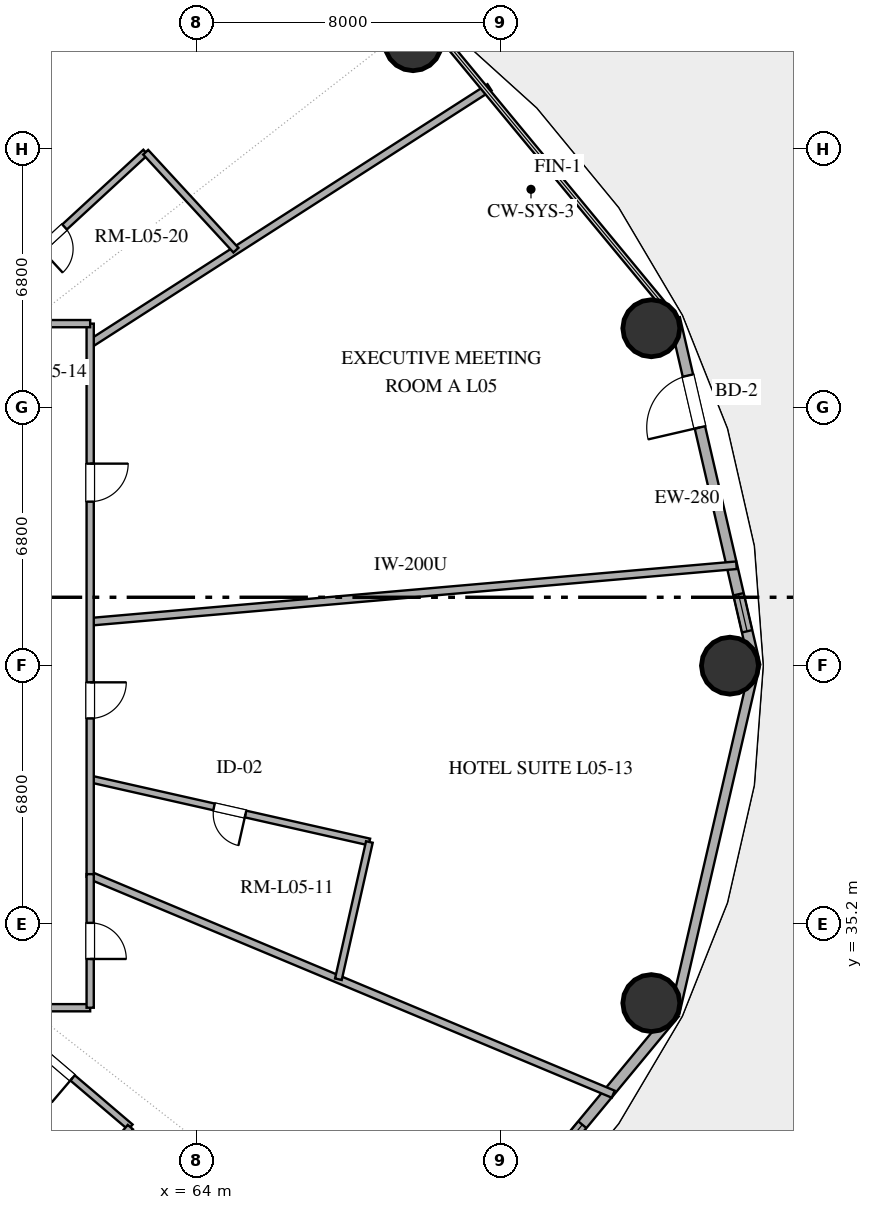
"""IFC4 building model, lengths in metres.
Left out: names, types, materials, properties, quantities, classifications, styles, units other than length and angle.
Written with IfcOpenShell. Run it as: python <this file> out.ifc"""

import sys

from ifc_helpers import new_model, si_unit, direction, frame, frame_2d, origin, origin_2d, place, context, subcontext, project, spatial, rectangle, hollow_circle, extrude, element, fill, save


model = new_model("IFC4")
c1 = context("Model", 3, precision=1e-05, world=origin(), true_north=direction((0.0, 1.0)))
c2 = subcontext(c1, "Body", "Model", "MODEL_VIEW")
j1 = project(units=[si_unit("LENGTHUNIT", "METRE"), si_unit("PLANEANGLEUNIT", "RADIAN")], contexts=[c1])
p1 = place(None, origin())
s1 = spatial("IfcSite", under=j1, at=p1, CompositionType="ELEMENT")
p2 = place(p1, origin())
s2 = spatial("IfcBuilding", under=s1, at=p2, CompositionType="ELEMENT")
p3 = place(p2, frame((0.0, 0.0, 28.2)))
s3 = spatial("IfcBuildingStorey", under=s2, at=p3, CompositionType="ELEMENT", Elevation=28.2)
for number, where, z_axis, x_axis in (
    (1, (78.035, 42.0, 0.0), (0.0, 0.0, 1.0), (1.0, 0.0, 0.0)),
    (2, (75.966, 50.878, 0.0), (0.0, 0.0, 1.0), (1.0, 0.0, 0.0)),
    (3, (69.697, 58.405, 0.0), (0.0, 0.0, 1.0), (1.0, 0.0, 0.0)),
    (4, (75.966, 33.122, 0.0), (0.0, 0.0, 1.0), (1.0, 0.0, 0.0)),
):
    element("IfcColumn", number, at=place(p3, frame(where, z_axis=z_axis, x_axis=x_axis)), inside=s3, PredefinedType="COLUMN", context=c2, shape_type="SweptSolid", body=[
        extrude(hollow_circle(Radius=0.75, WallThickness=0.04, at=origin_2d()), origin(), (0.0, 0.0, 1.0), 3.38),
    ])
p4 = place(p3, frame((78.696, 42.0, 0.0), z_axis=(0.0, 0.0, 1.0), x_axis=(-0.225454452941, 0.974253709076, 0.0)))
e5 = element("IfcWall", 5, at=p4, inside=s3, PredefinedType="SOLIDWALL", context=c2, shape_type="SweptSolid", body=[
    extrude(rectangle(XDim=9.38, YDim=0.28, at=frame_2d((4.69, 0.0))), origin(), (0.0, 0.0, 1.0), 3.38),
])
p5 = place(p4, frame((6.435, 0.0, 0.0)))
e6 = element("IfcOpeningElement", 6, at=p5, cuts=e5, PredefinedType="OPENING", context=c2, shape_type="SweptSolid", body=[
    extrude(rectangle(XDim=1.4, YDim=2.2, at=frame_2d((0.7, 1.1))), frame((0.0, 0.15, 0.0), z_axis=(0.0, -1.0, 0.0), x_axis=(1.0, 0.0, 0.0)), (0.0, 0.0, 1.0), 0.3),
])
p6 = place(p4, frame((0.929, 0.0, 0.85)))
e7 = element("IfcOpeningElement", 7, at=p6, cuts=e5, PredefinedType="OPENING", context=c2, shape_type="SweptSolid", body=[
    extrude(rectangle(XDim=1.0, YDim=1.8, at=frame_2d((0.5, 0.9))), frame((0.0, 0.15, 0.0), z_axis=(0.0, -1.0, 0.0), x_axis=(1.0, 0.0, 0.0)), (0.0, 0.0, 1.0), 0.3),
])
p7 = place(p3, frame((70.174, 25.114, 0.0), z_axis=(0.0, 0.0, 1.0), x_axis=(0.637296809613, 0.770618437657, 0.0)))
e8 = element("IfcWall", 8, at=p7, inside=s3, PredefinedType="SOLIDWALL", context=c2, shape_type="SweptSolid", body=[
    extrude(rectangle(XDim=10.053, YDim=0.28, at=frame_2d((5.027, 0.0))), origin(), (0.0, 0.0, 1.0), 3.38),
])
p8 = place(p7, frame((2.353, 0.0, 0.85)))
e9 = element("IfcOpeningElement", 9, at=p8, cuts=e8, PredefinedType="OPENING", context=c2, shape_type="SweptSolid", body=[
    extrude(rectangle(XDim=1.5, YDim=1.8, at=frame_2d((0.75, 0.9))), frame((0.0, 0.15, 0.0), z_axis=(0.0, -1.0, 0.0), x_axis=(1.0, 0.0, 0.0)), (0.0, 0.0, 1.0), 0.3),
])
p9 = place(p7, frame((4.74, 0.0, 0.85)))
e10 = element("IfcOpeningElement", 10, at=p9, cuts=e8, PredefinedType="OPENING", context=c2, shape_type="SweptSolid", body=[
    extrude(rectangle(XDim=1.5, YDim=1.8, at=frame_2d((0.75, 0.9))), frame((0.0, 0.15, 0.0), z_axis=(0.0, -1.0, 0.0), x_axis=(1.0, 0.0, 0.0)), (0.0, 0.0, 1.0), 0.3),
])
p10 = place(p3, frame((76.581, 32.862, 0.0), z_axis=(0.0, 0.0, 1.0), x_axis=(0.225454452941, 0.974253709076, 0.0)))
e11 = element("IfcWall", 11, at=p10, inside=s3, PredefinedType="SOLIDWALL", context=c2, shape_type="SweptSolid", body=[
    extrude(rectangle(XDim=9.38, YDim=0.25, at=frame_2d((4.69, 0.0))), origin(), (0.0, 0.0, 1.0), 3.38),
])
p11 = place(p3, frame((61.2, 43.155, 0.0), z_axis=(0.0, 0.0, 1.0), x_axis=(0.996194943742, 0.087152934912, 0.0)))
e12 = element("IfcWall", 12, at=p11, inside=s3, PredefinedType="PARTITIONING", context=c2, shape_type="SweptSolid", body=[
    extrude(rectangle(XDim=17.071, YDim=0.2, at=frame_2d((8.536, 0.0))), origin(), (0.0, 0.0, 1.0), 2.74),
])
p12 = place(p3, frame((53.116, 51.0, 0.0), z_axis=(0.0, 0.0, 1.0), x_axis=(0.494167535405, 0.869366693031, 0.0)))
e13 = element("IfcWall", 13, at=p12, inside=s3, PredefinedType="PARTITIONING", context=c2, shape_type="SweptSolid", body=[
    extrude(rectangle(XDim=14.934, YDim=0.2, at=frame_2d((7.467, 0.0))), origin(), (0.0, 0.0, 1.0), 2.74),
])
p13 = place(p3, frame((61.2, 50.472, 0.0), z_axis=(0.0, 0.0, 1.0), x_axis=(0.841576538847, 0.540137879863, 0.0)))
e14 = element("IfcWall", 14, at=p13, inside=s3, PredefinedType="PARTITIONING", context=c2, shape_type="SweptSolid", body=[
    extrude(rectangle(XDim=12.487, YDim=0.2, at=frame_2d((6.244, 0.0))), origin(), (0.0, 0.0, 1.0), 2.74),
])
p14 = place(p3, frame((61.2, 36.48, 0.0), z_axis=(0.0, 0.0, 1.0), x_axis=(0.922585702004, -0.385792201136, 0.0)))
e15 = element("IfcWall", 15, at=p14, inside=s3, PredefinedType="PARTITIONING", context=c2, shape_type="SweptSolid", body=[
    extrude(rectangle(XDim=14.918, YDim=0.2, at=frame_2d((7.459, 0.0))), origin(), (0.0, 0.0, 1.0), 2.74),
])
p15 = place(p3, frame((68.547, 37.361, 0.0), z_axis=(0.0, 0.0, 1.0), x_axis=(-0.975442349969, 0.220254902072, 0.0)))
e16 = element("IfcWall", 16, at=p15, inside=s3, PredefinedType="PLUMBINGWALL", context=c2, shape_type="SweptSolid", body=[
    extrude(rectangle(XDim=7.532, YDim=0.18, at=frame_2d((3.766, 0.0))), origin(), (0.0, 0.0, 1.0), 2.74),
])
p16 = place(p15, frame((3.341, 0.0, 0.0)))
e17 = element("IfcOpeningElement", 17, at=p16, cuts=e16, PredefinedType="OPENING", context=c2, shape_type="SweptSolid", body=[
    extrude(rectangle(XDim=0.85, YDim=2.1, at=frame_2d((0.425, 1.05))), frame((0.0, 0.1, 0.0), z_axis=(0.0, -1.0, 0.0), x_axis=(1.0, 0.0, 0.0)), (0.0, 0.0, 1.0), 0.2),
])
p17 = place(p3, frame((61.2, 51.0, 0.0), z_axis=(0.0, 0.0, 1.0), x_axis=(0.0, -1.0, 0.0)))
e18 = element("IfcWall", 18, at=p17, inside=s3, PredefinedType="PARTITIONING", context=c2, shape_type="SweptSolid", body=[
    extrude(rectangle(XDim=14.554, YDim=0.19, at=frame_2d((7.277, 0.0))), origin(), (0.0, 0.0, 1.0), 2.74),
])
p18 = place(p17, frame((3.684, 0.0, 0.0)))
e19 = element("IfcOpeningElement", 19, at=p18, cuts=e18, PredefinedType="OPENING", context=c2, shape_type="SweptSolid", body=[
    extrude(rectangle(XDim=1.0, YDim=2.2, at=frame_2d((0.5, 1.1))), frame((0.0, 0.105, 0.0), z_axis=(0.0, -1.0, 0.0), x_axis=(1.0, 0.0, 0.0)), (0.0, 0.0, 1.0), 0.21),
])
p19 = place(p17, frame((9.438, 0.0, 0.0)))
e20 = element("IfcOpeningElement", 20, at=p19, cuts=e18, PredefinedType="OPENING", context=c2, shape_type="SweptSolid", body=[
    extrude(rectangle(XDim=0.95, YDim=2.15, at=frame_2d((0.475, 1.075))), frame((0.0, 0.105, 0.0), z_axis=(0.0, -1.0, 0.0), x_axis=(1.0, 0.0, 0.0)), (0.0, 0.0, 1.0), 0.21),
])
p20 = place(p3, frame((55.449, 33.0, 0.0), z_axis=(0.0, 0.0, 1.0), x_axis=(0.637638501905, -0.770335732579, 0.0)))
e21 = element("IfcWall", 21, at=p20, inside=s3, PredefinedType="PARTITIONING", context=c2, shape_type="SweptSolid", body=[
    extrude(rectangle(XDim=14.187, YDim=0.2, at=frame_2d((7.094, 0.0))), origin(), (0.0, 0.0, 1.0), 2.74),
])
p21 = place(p3, frame((62.66, 55.51, 0.0), z_axis=(0.0, 0.0, 1.0), x_axis=(-0.735369975398, -0.67766584633, 0.0)))
e22 = element("IfcWall", 22, at=p21, inside=s3, PredefinedType="PLUMBINGWALL", context=c2, shape_type="SweptSolid", body=[
    extrude(rectangle(XDim=6.655, YDim=0.18, at=frame_2d((3.328, 0.0))), origin(), (0.0, 0.0, 1.0), 2.74),
])
p22 = place(p21, frame((2.903, 0.0, 0.0)))
e23 = element("IfcOpeningElement", 23, at=p22, cuts=e22, PredefinedType="OPENING", context=c2, shape_type="SweptSolid", body=[
    extrude(rectangle(XDim=0.85, YDim=2.1, at=frame_2d((0.425, 1.05))), frame((0.0, 0.1, 0.0), z_axis=(0.0, -1.0, 0.0), x_axis=(1.0, 0.0, 0.0)), (0.0, 0.0, 1.0), 0.2),
])
p23 = place(p3, frame((62.258, 29.859, 0.0), z_axis=(0.0, 0.0, 1.0), x_axis=(-0.761358380859, 0.648331254758, 0.0)))
e24 = element("IfcWall", 24, at=p23, inside=s3, PredefinedType="PLUMBINGWALL", context=c2, shape_type="SweptSolid", body=[
    extrude(rectangle(XDim=4.845, YDim=0.18, at=frame_2d((2.422, 0.0))), origin(), (0.0, 0.0, 1.0), 2.74),
])
p24 = place(p23, frame((1.997, 0.0, 0.0)))
e25 = element("IfcOpeningElement", 25, at=p24, cuts=e24, PredefinedType="OPENING", context=c2, shape_type="SweptSolid", body=[
    extrude(rectangle(XDim=0.85, YDim=2.1, at=frame_2d((0.425, 1.05))), frame((0.0, 0.1, 0.0), z_axis=(0.0, -1.0, 0.0), x_axis=(1.0, 0.0, 0.0)), (0.0, 0.0, 1.0), 0.2),
])
p25 = place(p3, frame((51.179, 51.0, 0.0), z_axis=(0.0, 0.0, 1.0), x_axis=(1.0, 0.0, 0.0)))
e26 = element("IfcWall", 26, at=p25, inside=s3, PredefinedType="PARTITIONING", context=c2, shape_type="SweptSolid", body=[
    extrude(rectangle(XDim=10.021, YDim=0.19, at=frame_2d((5.01, 0.0))), origin(), (0.0, 0.0, 1.0), 2.74),
])
p26 = place(p25, frame((3.792, 0.0, 0.0)))
e27 = element("IfcOpeningElement", 27, at=p26, cuts=e26, PredefinedType="OPENING", context=c2, shape_type="SweptSolid", body=[
    extrude(rectangle(XDim=0.95, YDim=2.15, at=frame_2d((0.475, 1.075))), frame((0.0, 0.105, 0.0), z_axis=(0.0, -1.0, 0.0), x_axis=(1.0, 0.0, 0.0)), (0.0, 0.0, 1.0), 0.21),
])
p27 = place(p3, frame((61.2, 33.0, 0.0), z_axis=(0.0, 0.0, 1.0), x_axis=(-1.0, 0.0, 0.0)))
e28 = element("IfcWall", 28, at=p27, inside=s3, PredefinedType="PARTITIONING", context=c2, shape_type="SweptSolid", body=[
    extrude(rectangle(XDim=11.3, YDim=0.19, at=frame_2d((5.65, 0.0))), origin(), (0.0, 0.0, 1.0), 2.74),
])
p28 = place(p27, frame((7.188, 0.0, 0.0)))
e29 = element("IfcOpeningElement", 29, at=p28, cuts=e28, PredefinedType="OPENING", context=c2, shape_type="SweptSolid", body=[
    extrude(rectangle(XDim=0.95, YDim=2.15, at=frame_2d((0.475, 1.075))), frame((0.0, 0.105, 0.0), z_axis=(0.0, -1.0, 0.0), x_axis=(1.0, 0.0, 0.0)), (0.0, 0.0, 1.0), 0.21),
])
p29 = place(p3, frame((67.731, 33.749, 0.0), z_axis=(0.0, 0.0, 1.0), x_axis=(0.220238608567, 0.9754460289, 0.0)))
e30 = element("IfcWall", 30, at=p29, inside=s3, PredefinedType="PLUMBINGWALL", context=c2, shape_type="SweptSolid", body=[
    extrude(rectangle(XDim=3.702, YDim=0.18, at=frame_2d((1.851, 0.0))), origin(), (0.0, 0.0, 1.0), 2.74),
])
p30 = place(p3, frame((61.2, 36.515, 0.0), z_axis=(0.0, 0.0, 1.0), x_axis=(0.0, -1.0, 0.0)))
e31 = element("IfcWall", 31, at=p30, inside=s3, PredefinedType="PARTITIONING", context=c2, shape_type="SweptSolid", body=[
    extrude(rectangle(XDim=3.515, YDim=0.19, at=frame_2d((1.758, 0.0))), origin(), (0.0, 0.0, 1.0), 2.74),
])
p31 = place(p30, frame((1.282, 0.0, 0.0)))
e32 = element("IfcOpeningElement", 32, at=p31, cuts=e31, PredefinedType="OPENING", context=c2, shape_type="SweptSolid", body=[
    extrude(rectangle(XDim=0.95, YDim=2.15, at=frame_2d((0.475, 1.075))), frame((0.0, 0.105, 0.0), z_axis=(0.0, -1.0, 0.0), x_axis=(1.0, 0.0, 0.0)), (0.0, 0.0, 1.0), 0.21),
])
p32 = place(p3, frame((65.035, 52.933, 0.0), z_axis=(0.0, 0.0, 1.0), x_axis=(-0.677675106239, 0.735361442002, 0.0)))
e33 = element("IfcWall", 33, at=p32, inside=s3, PredefinedType="PLUMBINGWALL", context=c2, shape_type="SweptSolid", body=[
    extrude(rectangle(XDim=3.504, YDim=0.18, at=frame_2d((1.752, 0.0))), origin(), (0.0, 0.0, 1.0), 2.74),
])
p33 = place(p3, frame((60.124, 27.353, 0.0), z_axis=(0.0, 0.0, 1.0), x_axis=(0.648326357453, 0.76136255111, 0.0)))
e34 = element("IfcWall", 34, at=p33, inside=s3, PredefinedType="PLUMBINGWALL", context=c2, shape_type="SweptSolid", body=[
    extrude(rectangle(XDim=3.292, YDim=0.18, at=frame_2d((1.646, 0.0))), origin(), (0.0, 0.0, 1.0), 2.74),
])
p34 = place(p5, origin())
e35 = element("IfcDoor", 35, at=p34, inside=s3, OperationType="SINGLE_SWING_LEFT", PredefinedType="DOOR", context=c2, shape_type="SweptSolid", body=[
    extrude(rectangle(XDim=1.4, YDim=2.2, at=frame_2d((0.7, 1.1))), frame((0.0, 0.025, 0.0), z_axis=(0.0, -1.0, 0.0), x_axis=(1.0, 0.0, 0.0)), (0.0, 0.0, 1.0), 0.05),
])
fill(e6, e35)
p35 = place(p9, origin())
e36 = element("IfcWindow", 36, at=p35, inside=s3, PartitioningType="SINGLE_PANEL", PredefinedType="WINDOW", context=c2, shape_type="SweptSolid", body=[
    extrude(rectangle(XDim=1.5, YDim=1.8, at=frame_2d((0.75, 0.9))), frame((0.0, 0.03, 0.0), z_axis=(0.0, -1.0, 0.0), x_axis=(1.0, 0.0, 0.0)), (0.0, 0.0, 1.0), 0.06),
])
fill(e10, e36)
p36 = place(p6, origin())
e37 = element("IfcWindow", 37, at=p36, inside=s3, PartitioningType="SINGLE_PANEL", PredefinedType="WINDOW", context=c2, shape_type="SweptSolid", body=[
    extrude(rectangle(XDim=1.0, YDim=1.8, at=frame_2d((0.5, 0.9))), frame((0.0, 0.03, 0.0), z_axis=(0.0, -1.0, 0.0), x_axis=(1.0, 0.0, 0.0)), (0.0, 0.0, 1.0), 0.06),
])
fill(e7, e37)
p37 = place(p16, origin())
e38 = element("IfcDoor", 38, at=p37, inside=s3, OperationType="SINGLE_SWING_LEFT", PredefinedType="DOOR", context=c2, shape_type="SweptSolid", body=[
    extrude(rectangle(XDim=0.85, YDim=2.1, at=frame_2d((0.425, 1.05))), frame((0.0, 0.025, 0.0), z_axis=(0.0, -1.0, 0.0), x_axis=(1.0, 0.0, 0.0)), (0.0, 0.0, 1.0), 0.05),
])
fill(e17, e38)
p38 = place(p18, origin())
e39 = element("IfcDoor", 39, at=p38, inside=s3, OperationType="SINGLE_SWING_LEFT", PredefinedType="DOOR", context=c2, shape_type="SweptSolid", body=[
    extrude(rectangle(XDim=1.0, YDim=2.2, at=frame_2d((0.5, 1.1))), frame((0.0, 0.025, 0.0), z_axis=(0.0, -1.0, 0.0), x_axis=(1.0, 0.0, 0.0)), (0.0, 0.0, 1.0), 0.05),
])
fill(e19, e39)
p39 = place(p19, origin())
e40 = element("IfcDoor", 40, at=p39, inside=s3, OperationType="SINGLE_SWING_LEFT", PredefinedType="DOOR", context=c2, shape_type="SweptSolid", body=[
    extrude(rectangle(XDim=0.95, YDim=2.15, at=frame_2d((0.475, 1.075))), frame((0.0, 0.025, 0.0), z_axis=(0.0, -1.0, 0.0), x_axis=(1.0, 0.0, 0.0)), (0.0, 0.0, 1.0), 0.05),
])
fill(e20, e40)
p40 = place(p22, origin())
e41 = element("IfcDoor", 41, at=p40, inside=s3, OperationType="SINGLE_SWING_RIGHT", PredefinedType="DOOR", context=c2, shape_type="SweptSolid", body=[
    extrude(rectangle(XDim=0.85, YDim=2.1, at=frame_2d((0.425, 1.05))), frame((0.0, 0.025, 0.0), z_axis=(0.0, -1.0, 0.0), x_axis=(1.0, 0.0, 0.0)), (0.0, 0.0, 1.0), 0.05),
])
fill(e23, e41)
p41 = place(p24, origin())
e42 = element("IfcDoor", 42, at=p41, inside=s3, OperationType="SINGLE_SWING_LEFT", PredefinedType="DOOR", context=c2, shape_type="SweptSolid", body=[
    extrude(rectangle(XDim=0.85, YDim=2.1, at=frame_2d((0.425, 1.05))), frame((0.0, 0.025, 0.0), z_axis=(0.0, -1.0, 0.0), x_axis=(1.0, 0.0, 0.0)), (0.0, 0.0, 1.0), 0.05),
])
fill(e25, e42)
p42 = place(p31, origin())
e43 = element("IfcDoor", 43, at=p42, inside=s3, OperationType="SINGLE_SWING_RIGHT", PredefinedType="DOOR", context=c2, shape_type="SweptSolid", body=[
    extrude(rectangle(XDim=0.95, YDim=2.15, at=frame_2d((0.475, 1.075))), frame((0.0, 0.025, 0.0), z_axis=(0.0, -1.0, 0.0), x_axis=(1.0, 0.0, 0.0)), (0.0, 0.0, 1.0), 0.05),
])
fill(e32, e43)
save(model, sys.argv[1])
